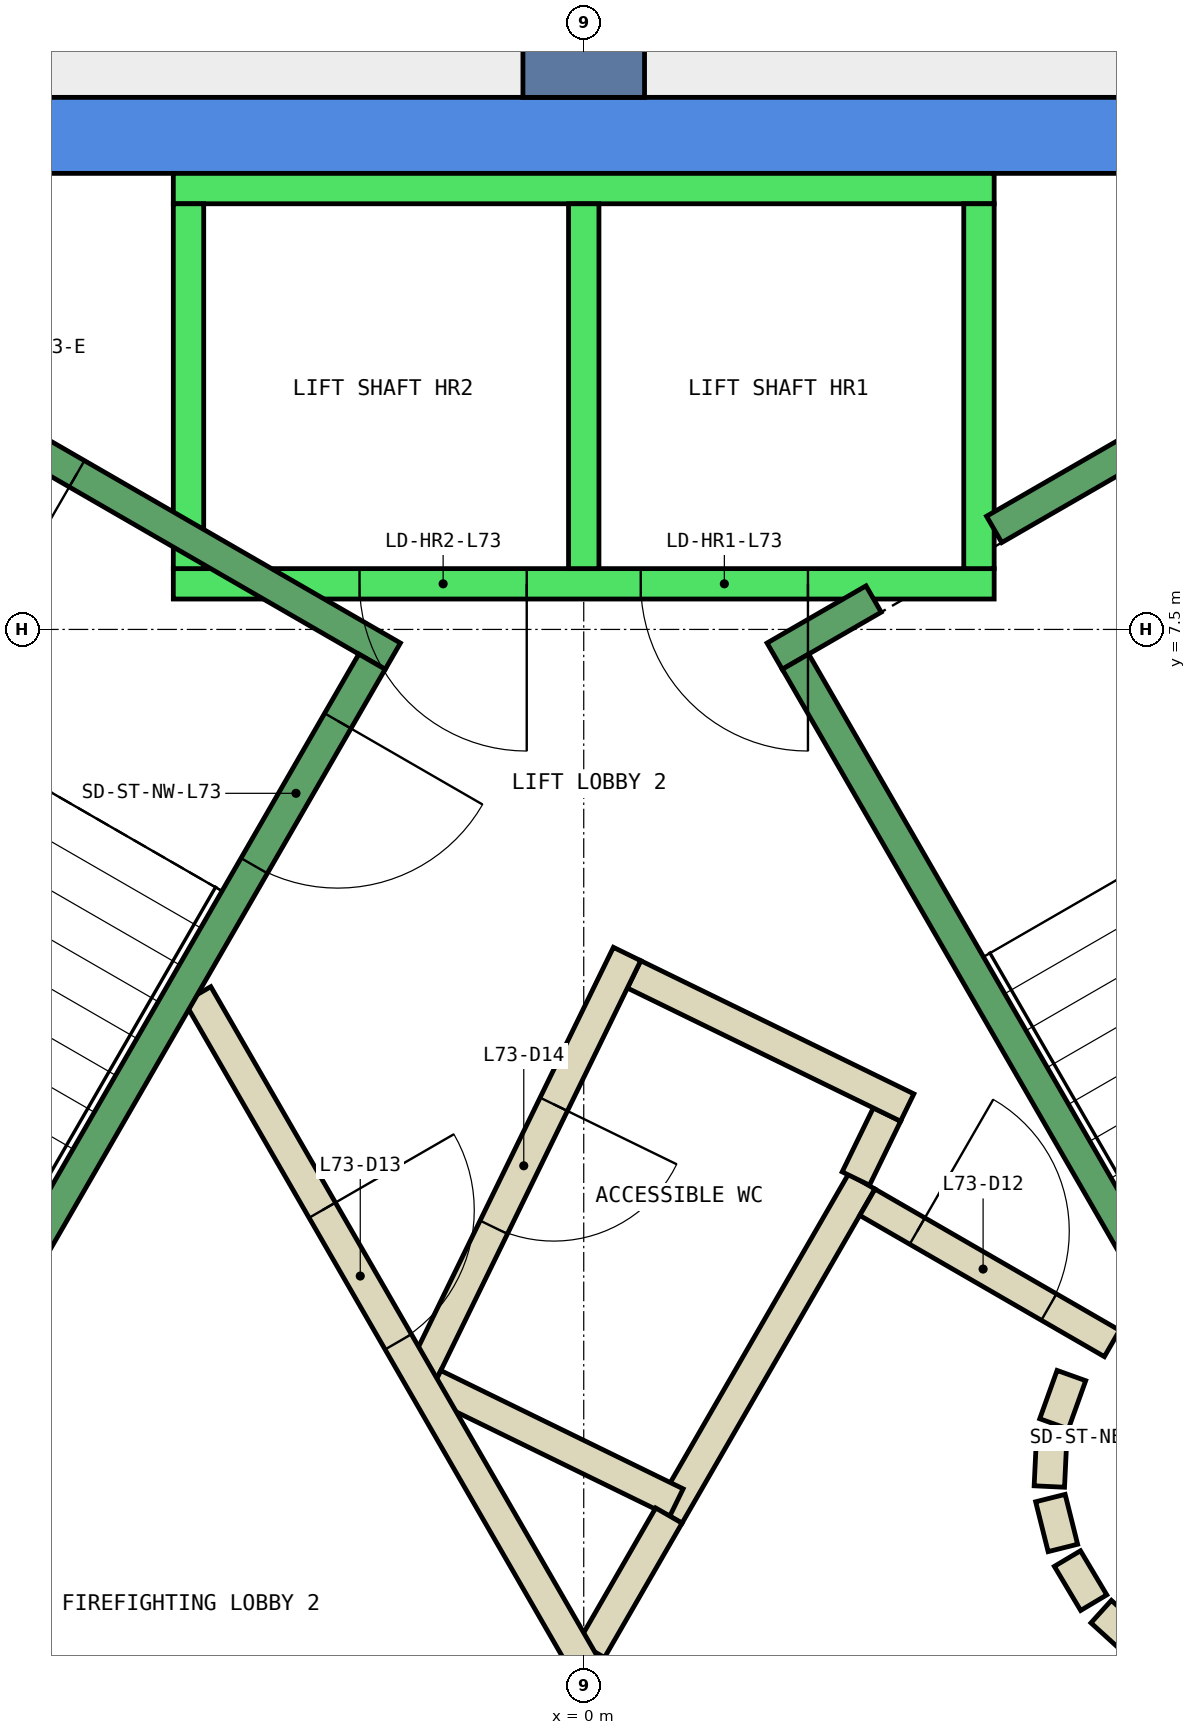
"""IFC4 building model, lengths in metres.
Left out: names, types, materials, properties, quantities, classifications, styles, units other than length and angle.
Written with IfcOpenShell. Run it as: python <this file> out.ifc"""

import sys

from ifc_helpers import new_model, si_unit, direction, frame, frame_2d, origin, place, context, subcontext, project, spatial, polyline, rectangle, outline, extrude, element, fill, save


model = new_model("IFC4")
c1 = context("Model", 3, precision=1e-05, world=origin(), true_north=direction((0.0, 1.0)))
c2 = subcontext(c1, "Body", "Model", "MODEL_VIEW")
j1 = project(units=[si_unit("LENGTHUNIT", "METRE"), si_unit("PLANEANGLEUNIT", "RADIAN")], contexts=[c1])
p1 = place(None, origin())
s1 = spatial("IfcSite", under=j1, at=p1, CompositionType="ELEMENT")
p2 = place(p1, origin())
s2 = spatial("IfcBuilding", under=s1, at=p2, CompositionType="ELEMENT")
p3 = place(p2, frame((0.0, 0.0, 311.6)))
s3 = spatial("IfcBuildingStorey", under=s2, at=p3, CompositionType="ELEMENT", Elevation=311.6)
p4 = place(p3, frame((0.0, 0.0, -0.34)))
e1 = element("IfcWall", 1, at=p4, inside=s3, PredefinedType="SHEAR", context=c2, shape_type="SweptSolid", body=[
    extrude(outline(polyline([(4.907, 11.0), (-4.907, 11.0), (-4.619, 10.5), (4.619, 10.5), (4.907, 11.0)])), origin(), (0.0, 0.0, 1.0), 3.6),
])
p5 = place(p3, frame((0.0, 11.0, -0.34), z_axis=(0.0, 0.0, 1.0), x_axis=(0.0, 1.0, 0.0)))
e2 = element("IfcWall", 2, at=p5, inside=s3, PredefinedType="SHEAR", context=c2, shape_type="SweptSolid", body=[
    extrude(rectangle(XDim=9.0, YDim=0.8, at=frame_2d((4.5, 0.0))), origin(), (0.0, 0.0, 1.0), 3.6),
])
p6 = place(p3, frame((0.56, 1.671, 0.0), z_axis=(0.0, 0.0, 1.0), x_axis=(0.500008334558, 0.866020591771, 0.0)))
e3 = element("IfcWall", 3, at=p6, inside=s3, PredefinedType="PARTITIONING", context=c2, shape_type="SweptSolid", body=[
    extrude(rectangle(XDim=2.538, YDim=0.2, at=frame_2d((1.269, 0.0))), origin(), (0.0, 0.0, 1.0), 3.26),
])
p7 = place(p3, frame((1.79, 3.888, 0.0), z_axis=(0.0, 0.0, 1.0), x_axis=(0.437807406823, 0.899068781869, 0.0)))
e4 = element("IfcWall", 4, at=p7, inside=s3, PredefinedType="PARTITIONING", context=c2, shape_type="SweptSolid", body=[
    extrude(rectangle(XDim=0.469, YDim=0.2, at=frame_2d((0.234, 0.0))), origin(), (0.0, 0.0, 1.0), 3.26),
])
p8 = place(p3, frame((2.128, 4.355, 0.0), z_axis=(0.0, 0.0, 1.0), x_axis=(-0.898876404494, 0.438202247191, 0.0)))
e5 = element("IfcWall", 5, at=p8, inside=s3, PredefinedType="PARTITIONING", context=c2, shape_type="SweptSolid", body=[
    extrude(rectangle(XDim=1.999, YDim=0.2, at=frame_2d((1.0, 0.0))), origin(), (0.0, 0.0, 1.0), 3.26),
])
p9 = place(p3, frame((0.285, 5.365, 0.0), z_axis=(0.0, 0.0, 1.0), x_axis=(-0.43840190643, -0.898779043168, 0.0)))
e6 = element("IfcWall", 6, at=p9, inside=s3, PredefinedType="PARTITIONING", context=c2, shape_type="SweptSolid", body=[
    extrude(rectangle(XDim=3.1, YDim=0.2, at=frame_2d((1.55, 0.0))), origin(), (0.0, 0.0, 1.0), 3.26),
])
p10 = place(p9, frame((1.1, 0.0, 0.0)))
e7 = element("IfcOpeningElement", 7, at=p10, cuts=e6, PredefinedType="OPENING", context=c2, shape_type="SweptSolid", body=[
    extrude(rectangle(XDim=0.9, YDim=2.1, at=frame_2d((0.45, 1.05))), frame((0.0, 0.11, 0.0), z_axis=(0.0, -1.0, 0.0), x_axis=(1.0, 0.0, 0.0)), (0.0, 0.0, 1.0), 0.22),
])
p11 = place(p3, frame((-0.984, 2.535, 0.0), z_axis=(0.0, 0.0, 1.0), x_axis=(0.898707583217, -0.438548378025, 0.0)))
e8 = element("IfcWall", 8, at=p11, inside=s3, PredefinedType="PARTITIONING", context=c2, shape_type="SweptSolid", body=[
    extrude(rectangle(XDim=1.774, YDim=0.2, at=frame_2d((0.887, 0.0))), origin(), (0.0, 0.0, 1.0), 3.26),
])
p12 = place(p3, frame((0.05, 0.787, 0.0), z_axis=(0.0, 0.0, 1.0), x_axis=(0.499819111317, 0.866129814729, 0.0)))
e9 = element("IfcWall", 9, at=p12, inside=s3, PredefinedType="PARTITIONING", context=c2, shape_type="SweptSolid", body=[
    extrude(rectangle(XDim=1.021, YDim=0.2, at=frame_2d((0.51, 0.0))), origin(), (0.0, 0.0, 1.0), 3.26),
])
p13 = place(p3, frame((1.866, 3.732, 0.0), z_axis=(0.0, 0.0, 1.0), x_axis=(0.866043361281, -0.499968895414, 0.0)))
e10 = element("IfcWall", 10, at=p13, inside=s3, PredefinedType="PARTITIONING", context=c2, shape_type="SweptSolid", body=[
    extrude(rectangle(XDim=1.858, YDim=0.2, at=frame_2d((0.929, 0.0))), origin(), (0.0, 0.0, 1.0), 3.26),
])
p14 = place(p13, frame((0.379, 0.0, 0.0)))
e11 = element("IfcOpeningElement", 11, at=p14, cuts=e10, PredefinedType="OPENING", context=c2, shape_type="SweptSolid", body=[
    extrude(rectangle(XDim=1.0, YDim=2.1, at=frame_2d((0.5, 1.05))), frame((0.0, 0.11, 0.0), z_axis=(0.0, -1.0, 0.0), x_axis=(1.0, 0.0, 0.0)), (0.0, 0.0, 1.0), 0.22),
])
p15 = place(p3, frame((3.208, 2.592, 0.0), z_axis=(0.0, 0.0, 1.0), x_axis=(-0.337388820924, -0.941365382578, 0.0)))
e12 = element("IfcWall", 12, at=p15, inside=s3, PredefinedType="PARTITIONING", context=c2, shape_type="SweptSolid", body=[
    extrude(rectangle(XDim=0.338, YDim=0.2, at=frame_2d((0.169, 0.0))), origin(), (0.0, 0.0, 1.0), 3.26),
])
p16 = place(p3, frame((3.079, 2.199, 0.0), z_axis=(0.0, 0.0, 1.0), x_axis=(-0.047771483479, -0.998858290933, 0.0)))
e13 = element("IfcWall", 13, at=p16, inside=s3, PredefinedType="PARTITIONING", context=c2, shape_type="SweptSolid", body=[
    extrude(rectangle(XDim=0.337, YDim=0.2, at=frame_2d((0.169, 0.0))), origin(), (0.0, 0.0, 1.0), 3.26),
])
p17 = place(p3, frame((3.07, 1.786, 0.0), z_axis=(0.0, 0.0, 1.0), x_axis=(0.242705583207, -0.970099994784, 0.0)))
e14 = element("IfcWall", 14, at=p17, inside=s3, PredefinedType="PARTITIONING", context=c2, shape_type="SweptSolid", body=[
    extrude(rectangle(XDim=0.338, YDim=0.2, at=frame_2d((0.169, 0.0))), origin(), (0.0, 0.0, 1.0), 3.26),
])
for number, where, z_axis, x_axis in (
    (15, (3.182, 1.388, 0.0), (0.0, 0.0, 1.0), (0.512, -0.859, 0.0)),
    (16, (3.404, 1.039, 0.0), (0.0, 0.0, 1.0), (0.74, -0.672, 0.0)),
):
    element("IfcWall", number, at=place(p3, frame(where, z_axis=z_axis, x_axis=x_axis)), inside=s3, PredefinedType="PARTITIONING", context=c2, shape_type="SweptSolid", body=[
        extrude(rectangle(XDim=0.338, YDim=0.2, at=frame_2d((0.169, 0.0))), origin(), (0.0, 0.0, 1.0), 3.26),
    ])
p18 = place(p3, frame((-2.54, 5.1, 0.0), z_axis=(0.0, 0.0, 1.0), x_axis=(0.499925051871, -0.866068670783, 0.0)))
e17 = element("IfcWall", 17, at=p18, inside=s3, PredefinedType="PARTITIONING", context=c2, shape_type="SweptSolid", body=[
    extrude(rectangle(XDim=5.181, YDim=0.2, at=frame_2d((2.59, 0.0))), origin(), (0.0, 0.0, 1.0), 3.26),
])
p19 = place(p18, frame((1.64, 0.0, 0.0)))
e18 = element("IfcOpeningElement", 18, at=p19, cuts=e17, PredefinedType="OPENING", context=c2, shape_type="SweptSolid", body=[
    extrude(rectangle(XDim=1.0, YDim=2.1, at=frame_2d((0.5, 1.05))), frame((0.0, 0.11, 0.0), z_axis=(0.0, -1.0, 0.0), x_axis=(1.0, 0.0, 0.0)), (0.0, 0.0, 1.0), 0.22),
])
p20 = place(p3, frame((2.7, 7.8, 0.0), z_axis=(0.0, 0.0, 1.0), x_axis=(-1.0, 0.0, 0.0)))
e19 = element("IfcWall", 19, at=p20, inside=s3, PredefinedType="STANDARD", context=c2, shape_type="SweptSolid", body=[
    extrude(rectangle(XDim=5.4, YDim=0.2, at=frame_2d((2.7, 0.0))), origin(), (0.0, 0.0, 1.0), 3.26),
])
p21 = place(p20, frame((1.225, 0.0, 0.0)))
e20 = element("IfcOpeningElement", 20, at=p21, cuts=e19, PredefinedType="OPENING", context=c2, shape_type="SweptSolid", body=[
    extrude(rectangle(XDim=1.1, YDim=2.1, at=frame_2d((0.55, 1.05))), frame((0.0, 0.11, 0.0), z_axis=(0.0, -1.0, 0.0), x_axis=(1.0, 0.0, 0.0)), (0.0, 0.0, 1.0), 0.22),
])
p22 = place(p20, frame((3.075, 0.0, 0.0)))
e21 = element("IfcOpeningElement", 21, at=p22, cuts=e19, PredefinedType="OPENING", context=c2, shape_type="SweptSolid", body=[
    extrude(rectangle(XDim=1.1, YDim=2.1, at=frame_2d((0.55, 1.05))), frame((0.0, 0.11, 0.0), z_axis=(0.0, -1.0, 0.0), x_axis=(1.0, 0.0, 0.0)), (0.0, 0.0, 1.0), 0.22),
])
p23 = place(p3, frame((2.7, 10.4, 0.0), z_axis=(0.0, 0.0, 1.0), x_axis=(-1.0, 0.0, 0.0)))
e22 = element("IfcWall", 22, at=p23, inside=s3, PredefinedType="STANDARD", context=c2, shape_type="SweptSolid", body=[
    extrude(rectangle(XDim=5.4, YDim=0.2, at=frame_2d((2.7, 0.0))), origin(), (0.0, 0.0, 1.0), 3.26),
])
for number, where, z_axis, x_axis in (
    (23, (2.6, 7.9, 0.0), (0.0, 0.0, 1.0), (0.0, 1.0, 0.0)),
    (24, (0.0, 7.9, 0.0), (0.0, 0.0, 1.0), (0.0, 1.0, 0.0)),
    (25, (-2.6, 7.9, 0.0), (0.0, 0.0, 1.0), (0.0, 1.0, 0.0)),
):
    element("IfcWall", number, at=place(p3, frame(where, z_axis=z_axis, x_axis=x_axis)), inside=s3, PredefinedType="STANDARD", context=c2, shape_type="SweptSolid", body=[
        extrude(rectangle(XDim=2.4, YDim=0.2, at=frame_2d((1.2, 0.0))), origin(), (0.0, 0.0, 1.0), 3.26),
    ])
p24 = place(p3, frame((-5.94, 2.188, 0.0), z_axis=(0.0, 0.0, 1.0), x_axis=(0.500034260056, -0.866005622828, 0.0)))
e26 = element("IfcWall", 26, at=p24, inside=s3, PredefinedType="STANDARD", context=c2, shape_type="SweptSolid", body=[
    extrude(rectangle(XDim=5.399, YDim=0.2, at=frame_2d((2.7, 0.0))), origin(), (0.0, 0.0, 1.0), 3.26),
])
p25 = place(p24, frame((3.075, 0.0, 0.0)))
e27 = element("IfcOpeningElement", 27, at=p25, cuts=e26, PredefinedType="OPENING", context=c2, shape_type="SweptSolid", body=[
    extrude(rectangle(XDim=1.1, YDim=2.1, at=frame_2d((0.55, 1.05))), frame((0.0, 0.11, 0.0), z_axis=(0.0, -1.0, 0.0), x_axis=(1.0, 0.0, 0.0)), (0.0, 0.0, 1.0), 0.22),
])
p26 = place(p24, frame((1.225, 0.0, 0.0)))
e28 = element("IfcOpeningElement", 28, at=p26, cuts=e26, PredefinedType="OPENING", context=c2, shape_type="SweptSolid", body=[
    extrude(rectangle(XDim=1.1, YDim=2.1, at=frame_2d((0.55, 1.05))), frame((0.0, 0.11, 0.0), z_axis=(0.0, -1.0, 0.0), x_axis=(1.0, 0.0, 0.0)), (0.0, 0.0, 1.0), 0.22),
])
p27 = place(p3, frame((3.24, -2.488, 0.0), z_axis=(0.0, 0.0, 1.0), x_axis=(0.500034260056, 0.866005622828, 0.0)))
e29 = element("IfcWall", 29, at=p27, inside=s3, PredefinedType="STANDARD", context=c2, shape_type="SweptSolid", body=[
    extrude(rectangle(XDim=5.399, YDim=0.2, at=frame_2d((2.7, 0.0))), origin(), (0.0, 0.0, 1.0), 3.26),
])
p28 = place(p27, frame((3.225, 0.0, 0.0)))
e30 = element("IfcOpeningElement", 30, at=p28, cuts=e29, PredefinedType="OPENING", context=c2, shape_type="SweptSolid", body=[
    extrude(rectangle(XDim=1.1, YDim=2.1, at=frame_2d((0.55, 1.05))), frame((0.0, 0.11, 0.0), z_axis=(0.0, -1.0, 0.0), x_axis=(1.0, 0.0, 0.0)), (0.0, 0.0, 1.0), 0.22),
])
p29 = place(p27, frame((1.225, 0.0, 0.0)))
e31 = element("IfcOpeningElement", 31, at=p29, cuts=e29, PredefinedType="OPENING", context=c2, shape_type="SweptSolid", body=[
    extrude(rectangle(XDim=1.1, YDim=2.1, at=frame_2d((0.55, 1.05))), frame((0.0, 0.11, 0.0), z_axis=(0.0, -1.0, 0.0), x_axis=(1.0, 0.0, 0.0)), (0.0, 0.0, 1.0), 0.22),
])
p30 = place(p3, frame((2.7, 8.158, 0.0), z_axis=(0.0, 0.0, 1.0), x_axis=(0.86611865017, 0.499838457731, 0.0)))
e32 = element("IfcWall", 32, at=p30, inside=s3, PredefinedType="STANDARD", context=c2, shape_type="SweptSolid", body=[
    extrude(rectangle(XDim=2.733, YDim=0.2, at=frame_2d((1.366, 0.0))), origin(), (0.0, 0.0, 1.0), 3.26),
])
p31 = place(p3, frame((1.256, 7.324, 0.0), z_axis=(0.0, 0.0, 1.0), x_axis=(0.865915093549, 0.500191014278, 0.0)))
e33 = element("IfcWall", 33, at=p31, inside=s3, PredefinedType="STANDARD", context=c2, shape_type="SweptSolid", body=[
    extrude(rectangle(XDim=0.752, YDim=0.2, at=frame_2d((0.376, 0.0))), origin(), (0.0, 0.0, 1.0), 3.26),
])
p32 = place(p3, frame((4.843, 1.312, 0.0), z_axis=(0.0, 0.0, 1.0), x_axis=(-0.499963383562, 0.866046543262, 0.0)))
e34 = element("IfcWall", 34, at=p32, inside=s3, PredefinedType="STANDARD", context=c2, shape_type="SweptSolid", body=[
    extrude(rectangle(XDim=6.9, YDim=0.2, at=frame_2d((3.45, 0.0))), origin(), (0.0, 0.0, 1.0), 3.26),
])
p33 = place(p32, frame((0.45, 0.0, 0.0)))
e35 = element("IfcOpeningElement", 35, at=p33, cuts=e34, PredefinedType="OPENING", context=c2, shape_type="SweptSolid", body=[
    extrude(rectangle(XDim=1.1, YDim=2.2, at=frame_2d((0.55, 1.1))), frame((0.0, 0.11, 0.0), z_axis=(0.0, -1.0, 0.0), x_axis=(1.0, 0.0, 0.0)), (0.0, 0.0, 1.0), 0.22),
])
p34 = place(p3, frame((-1.256, 7.324, 0.0), z_axis=(0.0, 0.0, 1.0), x_axis=(-0.866046073146, 0.499964197906, 0.0)))
e36 = element("IfcWall", 36, at=p34, inside=s3, PredefinedType="STANDARD", context=c2, shape_type="SweptSolid", body=[
    extrude(rectangle(XDim=4.4, YDim=0.2, at=frame_2d((2.2, 0.0))), origin(), (0.0, 0.0, 1.0), 3.26),
])
p35 = place(p34, frame((2.4, 0.0, 0.0)))
e37 = element("IfcOpeningElement", 37, at=p35, cuts=e36, PredefinedType="OPENING", context=c2, shape_type="SweptSolid", body=[
    extrude(rectangle(XDim=1.1, YDim=2.2, at=frame_2d((0.55, 1.1))), frame((0.0, 0.11, 0.0), z_axis=(0.0, -1.0, 0.0), x_axis=(1.0, 0.0, 0.0)), (0.0, 0.0, 1.0), 0.22),
])
p36 = place(p3, frame((-1.393, 7.288, 0.0), z_axis=(0.0, 0.0, 1.0), x_axis=(-0.499963383562, -0.866046543262, 0.0)))
e38 = element("IfcWall", 38, at=p36, inside=s3, PredefinedType="STANDARD", context=c2, shape_type="SweptSolid", body=[
    extrude(rectangle(XDim=6.9, YDim=0.2, at=frame_2d((3.45, 0.0))), origin(), (0.0, 0.0, 1.0), 3.26),
])
p37 = place(p36, frame((0.45, 0.0, 0.0)))
e39 = element("IfcOpeningElement", 39, at=p37, cuts=e38, PredefinedType="OPENING", context=c2, shape_type="SweptSolid", body=[
    extrude(rectangle(XDim=1.1, YDim=2.2, at=frame_2d((0.55, 1.1))), frame((0.0, 0.11, 0.0), z_axis=(0.0, -1.0, 0.0), x_axis=(1.0, 0.0, 0.0)), (0.0, 0.0, 1.0), 0.22),
])
p38 = place(p14, origin())
e40 = element("IfcDoor", 40, at=p38, inside=s3, OperationType="SINGLE_SWING_LEFT", PredefinedType="DOOR", context=c2, shape_type="SweptSolid", body=[
    extrude(rectangle(XDim=1.0, YDim=2.1, at=frame_2d((0.5, 1.05))), frame((0.0, 0.025, 0.0), z_axis=(0.0, -1.0, 0.0), x_axis=(1.0, 0.0, 0.0)), (0.0, 0.0, 1.0), 0.05),
])
fill(e11, e40)
p39 = place(p19, origin())
e41 = element("IfcDoor", 41, at=p39, inside=s3, OperationType="SINGLE_SWING_RIGHT", PredefinedType="DOOR", context=c2, shape_type="SweptSolid", body=[
    extrude(rectangle(XDim=1.0, YDim=2.1, at=frame_2d((0.5, 1.05))), frame((0.0, 0.025, 0.0), z_axis=(0.0, -1.0, 0.0), x_axis=(1.0, 0.0, 0.0)), (0.0, 0.0, 1.0), 0.05),
])
fill(e18, e41)
p40 = place(p10, origin())
e42 = element("IfcDoor", 42, at=p40, inside=s3, OperationType="SINGLE_SWING_RIGHT", PredefinedType="DOOR", context=c2, shape_type="SweptSolid", body=[
    extrude(rectangle(XDim=0.9, YDim=2.1, at=frame_2d((0.45, 1.05))), frame((0.0, 0.025, 0.0), z_axis=(0.0, -1.0, 0.0), x_axis=(1.0, 0.0, 0.0)), (0.0, 0.0, 1.0), 0.05),
])
fill(e7, e42)
p41 = place(p21, origin())
e43 = element("IfcDoor", 43, at=p41, inside=s3, OperationType="SLIDING_TO_LEFT", PredefinedType="DOOR", context=c2, shape_type="SweptSolid", body=[
    extrude(rectangle(XDim=1.1, YDim=2.1, at=frame_2d((0.55, 1.05))), frame((0.0, 0.025, 0.0), z_axis=(0.0, -1.0, 0.0), x_axis=(1.0, 0.0, 0.0)), (0.0, 0.0, 1.0), 0.05),
])
fill(e20, e43)
p42 = place(p22, origin())
e44 = element("IfcDoor", 44, at=p42, inside=s3, OperationType="SLIDING_TO_LEFT", PredefinedType="DOOR", context=c2, shape_type="SweptSolid", body=[
    extrude(rectangle(XDim=1.1, YDim=2.1, at=frame_2d((0.55, 1.05))), frame((0.0, 0.025, 0.0), z_axis=(0.0, -1.0, 0.0), x_axis=(1.0, 0.0, 0.0)), (0.0, 0.0, 1.0), 0.05),
])
fill(e21, e44)
p43 = place(p37, origin())
e45 = element("IfcDoor", 45, at=p43, inside=s3, OperationType="SINGLE_SWING_LEFT", PredefinedType="DOOR", context=c2, shape_type="SweptSolid", body=[
    extrude(rectangle(XDim=1.1, YDim=2.2, at=frame_2d((0.55, 1.1))), frame((0.0, 0.025, 0.0), z_axis=(0.0, -1.0, 0.0), x_axis=(1.0, 0.0, 0.0)), (0.0, 0.0, 1.0), 0.05),
])
fill(e39, e45)
p44 = place(p35, origin())
e46 = element("IfcDoor", 46, at=p44, inside=s3, OperationType="SINGLE_SWING_LEFT", PredefinedType="DOOR", context=c2, shape_type="SweptSolid", body=[
    extrude(rectangle(XDim=1.1, YDim=2.2, at=frame_2d((0.55, 1.1))), frame((0.0, 0.025, 0.0), z_axis=(0.0, -1.0, 0.0), x_axis=(1.0, 0.0, 0.0)), (0.0, 0.0, 1.0), 0.05),
])
fill(e37, e46)
save(model, sys.argv[1])
